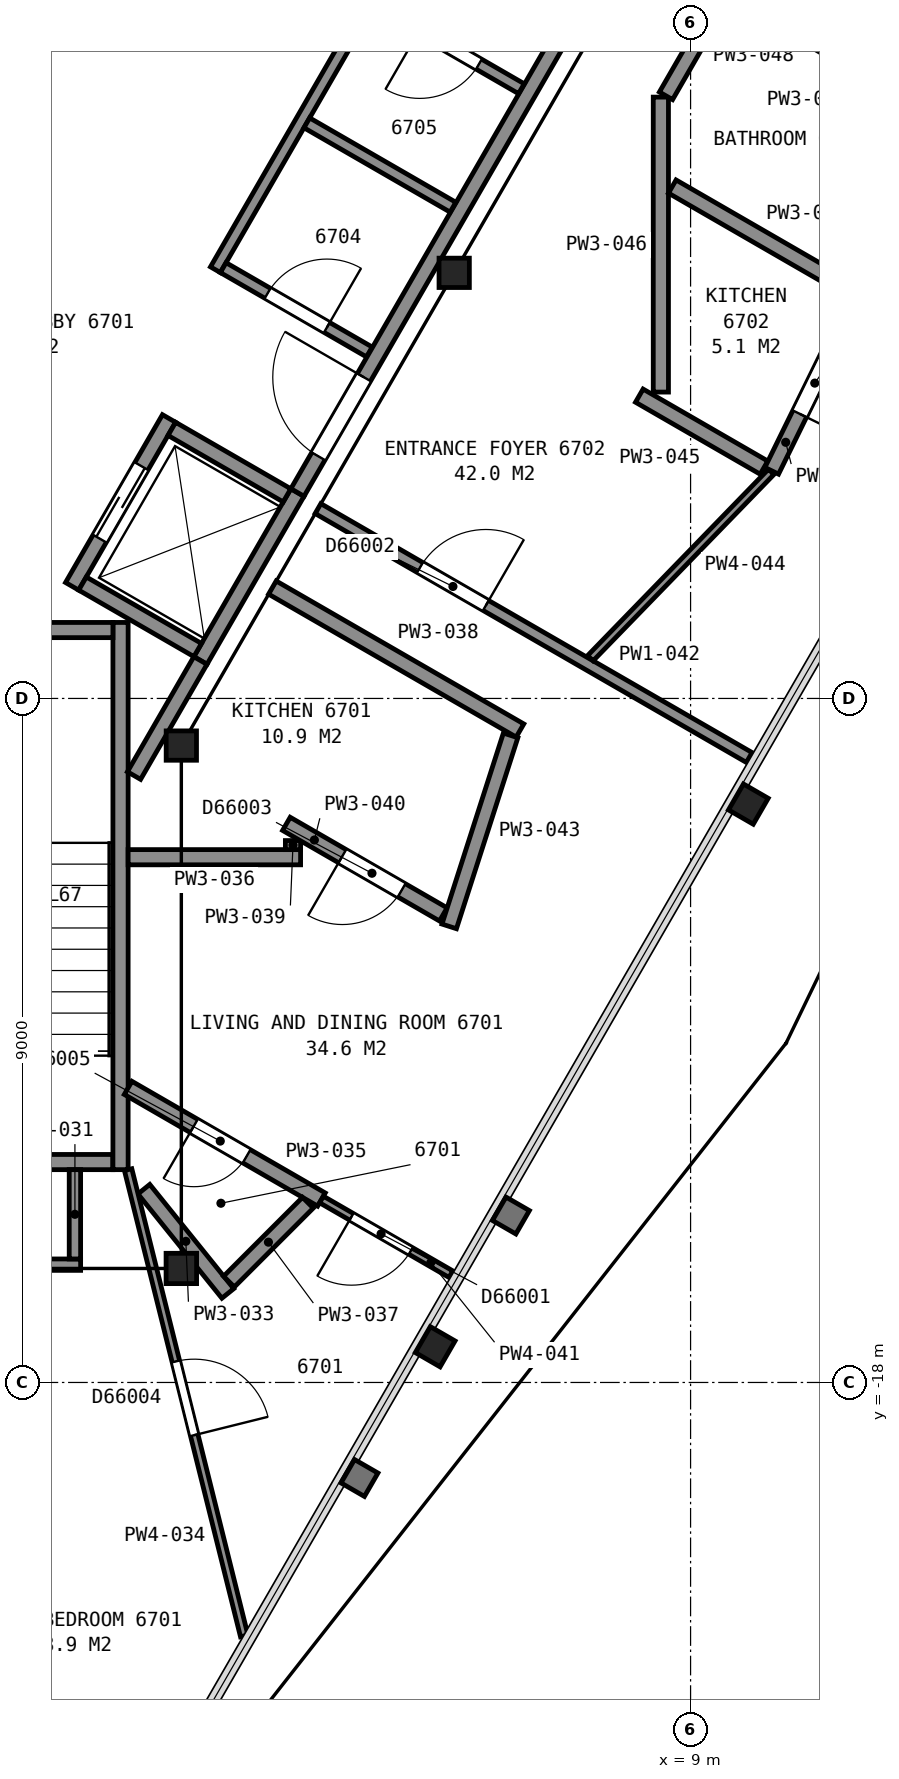
"""IFC4 building model, lengths in metres.
Left out: names, types, materials, properties, quantities, classifications, styles, units other than length and angle.
Written with IfcOpenShell. Run it as: python <this file> out.ifc"""

import sys

from ifc_helpers import new_model, si_unit, direction, frame, frame_2d, origin, origin_2d, place, context, subcontext, project, spatial, rectangle, i_section, extrude, element, fill, save


model = new_model("IFC4")
c1 = context("Model", 3, precision=1e-05, world=origin(), true_north=direction((0.0, 1.0)))
c2 = subcontext(c1, "Body", "Model", "MODEL_VIEW")
j1 = project(units=[si_unit("LENGTHUNIT", "METRE"), si_unit("PLANEANGLEUNIT", "RADIAN")], contexts=[c1])
p1 = place(None, origin())
s1 = spatial("IfcSite", under=j1, at=p1, CompositionType="ELEMENT")
p2 = place(p1, origin())
s2 = spatial("IfcBuilding", under=s1, at=p2, CompositionType="ELEMENT")
p3 = place(p2, frame((0.0, 0.0, 267.7)))
s3 = spatial("IfcBuildingStorey", under=s2, at=p3, CompositionType="ELEMENT", Elevation=267.7)
for number, where, z_axis, x_axis in (
    (1, (5.64, -17.53, 0.0), (0.0, 0.0, 1.0), (-0.5, -0.866, 0.0)),
    (2, (9.76, -10.39, 0.0), (0.0, 0.0, 1.0), (-0.5, -0.866, 0.0)),
):
    element("IfcColumn", number, at=place(p3, frame(where, z_axis=z_axis, x_axis=x_axis)), inside=s3, PredefinedType="COLUMN", context=c2, shape_type="SweptSolid", body=[
        extrude(i_section(OverallWidth=0.394, OverallDepth=0.376, WebThickness=0.017, FlangeThickness=0.028, FilletRadius=0.015, at=origin_2d()), origin(), (0.0, 0.0, 1.0), 3.7),
    ])
p4 = place(p3, frame((2.3, -16.5, 0.0), z_axis=(0.0, 0.0, 1.0), x_axis=(-1.0, 0.0, 0.0)))
e3 = element("IfcColumn", 3, at=p4, inside=s3, PredefinedType="COLUMN", context=c2, shape_type="SweptSolid", body=[
    extrude(i_section(OverallWidth=0.401, OverallDepth=0.399, WebThickness=0.025, FlangeThickness=0.04, FilletRadius=0.015, at=origin_2d()), origin(), (0.0, 0.0, 1.0), 3.7),
])
for number, where, z_axis, x_axis in (
    (4, (2.3, -9.62, 0.0), (0.0, 0.0, 1.0), (1.0, 0.0, 0.0)),
    (5, (5.89, -3.4, 0.0), (0.0, 0.0, 1.0), (1.0, 0.0, 0.0)),
):
    element("IfcColumn", number, at=place(p3, frame(where, z_axis=z_axis, x_axis=x_axis)), inside=s3, PredefinedType="COLUMN", context=c2, shape_type="SweptSolid", body=[
        extrude(i_section(OverallWidth=0.399, OverallDepth=0.386, WebThickness=0.021, FlangeThickness=0.033, FilletRadius=0.015, at=origin_2d()), origin(), (0.0, 0.0, 1.0), 3.7),
    ])
p5 = place(p3, frame((-1.4, -15.1, 0.0), z_axis=(0.0, 0.0, 1.0), x_axis=(1.0, 0.0, 0.0)))
e6 = element("IfcWall", 6, at=p5, inside=s3, PredefinedType="PARTITIONING", context=c2, shape_type="SweptSolid", body=[
    extrude(rectangle(XDim=2.8, YDim=0.2, at=frame_2d((1.4, 0.0))), origin(), (0.0, 0.0, 1.0), 3.45),
])
p6 = place(p5, frame((0.85, 0.0, 0.0)))
e7 = element("IfcOpeningElement", 7, at=p6, cuts=e6, PredefinedType="OPENING", context=c2, shape_type="SweptSolid", body=[
    extrude(rectangle(XDim=1.1, YDim=2.1, at=frame_2d((0.55, 1.05))), frame((0.0, 0.11, 0.0), z_axis=(0.0, -1.0, 0.0), x_axis=(1.0, 0.0, 0.0)), (0.0, 0.0, 1.0), 0.22),
])
p7 = place(p3, frame((1.5, -8.0, 0.0), z_axis=(0.0, 0.0, 1.0), x_axis=(0.0, -1.0, 0.0)))
e8 = element("IfcWall", 8, at=p7, inside=s3, PredefinedType="PARTITIONING", context=c2, shape_type="SweptSolid", body=[
    extrude(rectangle(XDim=7.2, YDim=0.2, at=frame_2d((3.6, 0.0))), origin(), (0.0, 0.0, 1.0), 3.45),
])
p8 = place(p3, frame((-1.4, -8.1, 0.0), z_axis=(0.0, 0.0, 1.0), x_axis=(1.0, 0.0, 0.0)))
e9 = element("IfcWall", 9, at=p8, inside=s3, PredefinedType="PARTITIONING", context=c2, shape_type="SweptSolid", body=[
    extrude(rectangle(XDim=2.8, YDim=0.2, at=frame_2d((1.4, 0.0))), origin(), (0.0, 0.0, 1.0), 3.45),
])
p9 = place(p3, frame((2.552, -8.5, 0.0), z_axis=(0.0, 0.0, 1.0), x_axis=(0.499990435942, 0.866030925526, 0.0)))
e10 = element("IfcWall", 10, at=p9, inside=s3, PredefinedType="PARTITIONING", context=c2, shape_type="SweptSolid", body=[
    extrude(rectangle(XDim=2.55, YDim=0.2, at=frame_2d((1.275, 0.0))), origin(), (0.0, 0.0, 1.0), 3.7),
])
p10 = place(p3, frame((0.863, -7.525, 0.0), z_axis=(0.0, 0.0, 1.0), x_axis=(0.499990435942, 0.866030925526, 0.0)))
e11 = element("IfcWall", 11, at=p10, inside=s3, PredefinedType="PARTITIONING", context=c2, shape_type="SweptSolid", body=[
    extrude(rectangle(XDim=2.55, YDim=0.2, at=frame_2d((1.275, 0.0))), origin(), (0.0, 0.0, 1.0), 3.7),
])
p11 = place(p10, frame((0.725, 0.0, 0.0)))
e12 = element("IfcOpeningElement", 12, at=p11, cuts=e11, PredefinedType="OPENING", context=c2, shape_type="SweptSolid", body=[
    extrude(rectangle(XDim=1.1, YDim=2.1, at=frame_2d((0.55, 1.05))), frame((0.0, 0.11, 0.0), z_axis=(0.0, -1.0, 0.0), x_axis=(1.0, 0.0, 0.0)), (0.0, 0.0, 1.0), 0.22),
])
for number, where, z_axis, x_axis in (
    (13, (3.69, -6.328, 0.0), (0.0, 0.0, 1.0), (-0.866, 0.5, 0.0)),
    (14, (2.515, -8.363, 0.0), (0.0, 0.0, 1.0), (-0.866, 0.5, 0.0)),
):
    element("IfcWall", number, at=place(p3, frame(where, z_axis=z_axis, x_axis=x_axis)), inside=s3, PredefinedType="PARTITIONING", context=c2, shape_type="SweptSolid", body=[
        extrude(rectangle(XDim=1.75, YDim=0.2, at=frame_2d((0.875, 0.0))), origin(), (0.0, 0.0, 1.0), 3.7),
    ])
p12 = place(p3, frame((1.677, -10.015, 0.0), z_axis=(0.0, 0.0, 1.0), x_axis=(0.49983532306, 0.866120459187, 0.0)))
e15 = element("IfcWall", 15, at=p12, inside=s3, PredefinedType="PARTITIONING", context=c2, shape_type="SweptSolid", body=[
    extrude(rectangle(XDim=1.748, YDim=0.2, at=frame_2d((0.874, 0.0))), origin(), (0.0, 0.0, 1.0), 3.45),
])
p13 = place(p3, frame((2.749, -3.359, 0.0), z_axis=(0.0, 0.0, 1.0), x_axis=(0.500017827812, 0.866015110648, 0.0)))
e16 = element("IfcWall", 16, at=p13, inside=s3, PredefinedType="PARTITIONING", context=c2, shape_type="SweptSolid", body=[
    extrude(rectangle(XDim=4.15, YDim=0.15, at=frame_2d((2.075, 0.0))), origin(), (0.0, 0.0, 1.0), 3.45),
])
p14 = place(p3, frame((2.851, -3.332, 0.0), z_axis=(0.0, 0.0, 1.0), x_axis=(0.866110524189, -0.499852538144, 0.0)))
e17 = element("IfcWall", 17, at=p14, inside=s3, PredefinedType="PARTITIONING", context=c2, shape_type="SweptSolid", body=[
    extrude(rectangle(XDim=2.22, YDim=0.15, at=frame_2d((1.11, 0.0))), origin(), (0.0, 0.0, 1.0), 3.45),
])
p15 = place(p14, frame((0.675, 0.0, 0.0)))
e18 = element("IfcOpeningElement", 18, at=p15, cuts=e17, PredefinedType="OPENING", context=c2, shape_type="SweptSolid", body=[
    extrude(rectangle(XDim=0.9, YDim=2.1, at=frame_2d((0.45, 1.05))), frame((0.0, 0.085, 0.0), z_axis=(0.0, -1.0, 0.0), x_axis=(1.0, 0.0, 0.0)), (0.0, 0.0, 1.0), 0.17),
])
p16 = place(p3, frame((3.828, -6.29, 0.0), z_axis=(0.0, 0.0, 1.0), x_axis=(0.499979739078, 0.866037101117, 0.0)))
e19 = element("IfcWall", 19, at=p16, inside=s3, PredefinedType="PARTITIONING", context=c2, shape_type="SweptSolid", body=[
    extrude(rectangle(XDim=11.363, YDim=0.2, at=frame_2d((5.681, 0.0))), origin(), (0.0, 0.0, 1.0), 3.45),
])
p17 = place(p16, frame((0.55, 0.0, 0.0)))
e20 = element("IfcOpeningElement", 20, at=p17, cuts=e19, PredefinedType="OPENING", context=c2, shape_type="SweptSolid", body=[
    extrude(rectangle(XDim=1.2, YDim=2.1, at=frame_2d((0.6, 1.05))), frame((0.0, 0.11, 0.0), z_axis=(0.0, -1.0, 0.0), x_axis=(1.0, 0.0, 0.0)), (0.0, 0.0, 1.0), 0.22),
])
p18 = place(p3, frame((3.951, -1.427, 0.0), z_axis=(0.0, 0.0, 1.0), x_axis=(0.866062920605, -0.499935013329, 0.0)))
e21 = element("IfcWall", 21, at=p18, inside=s3, PredefinedType="PARTITIONING", context=c2, shape_type="SweptSolid", body=[
    extrude(rectangle(XDim=2.22, YDim=0.15, at=frame_2d((1.11, 0.0))), origin(), (0.0, 0.0, 1.0), 3.45),
])
p19 = place(p3, frame((6.774, -0.978, 0.0), z_axis=(0.0, 0.0, 1.0), x_axis=(-0.866062920605, 0.499935013329, 0.0)))
e22 = element("IfcWall", 22, at=p19, inside=s3, PredefinedType="PARTITIONING", context=c2, shape_type="SweptSolid", body=[
    extrude(rectangle(XDim=2.22, YDim=0.15, at=frame_2d((1.11, 0.0))), origin(), (0.0, 0.0, 1.0), 3.45),
])
p20 = place(p19, frame((0.646, 0.0, 0.0)))
e23 = element("IfcOpeningElement", 23, at=p20, cuts=e22, PredefinedType="OPENING", context=c2, shape_type="SweptSolid", body=[
    extrude(rectangle(XDim=0.9, YDim=2.1, at=frame_2d((0.45, 1.05))), frame((0.0, 0.085, 0.0), z_axis=(0.0, -1.0, 0.0), x_axis=(1.0, 0.0, 0.0)), (0.0, 0.0, 1.0), 0.17),
])
p21 = place(p3, frame((-1.65, -16.45, 0.0), z_axis=(0.0, 0.0, 1.0), x_axis=(1.0, 0.0, 0.0)))
e24 = element("IfcWall", 24, at=p21, inside=s3, PredefinedType="PARTITIONING", context=c2, shape_type="SweptSolid", body=[
    extrude(rectangle(XDim=2.625, YDim=0.15, at=frame_2d((1.312, 0.0))), origin(), (0.0, 0.0, 1.0), 2.723),
])
p22 = place(p3, frame((0.9, -16.375, 0.0), z_axis=(0.0, 0.0, 1.0), x_axis=(0.0, 1.0, 0.0)))
e25 = element("IfcWall", 25, at=p22, inside=s3, PredefinedType="PARTITIONING", context=c2, shape_type="SweptSolid", body=[
    extrude(rectangle(XDim=1.175, YDim=0.15, at=frame_2d((0.587, 0.0))), origin(), (0.0, 0.0, 1.0), 2.723),
])
p23 = place(p3, frame((1.807, -15.457, 0.0), z_axis=(0.0, 0.0, 1.0), x_axis=(0.62721044395, -0.778849830841, 0.0)))
e26 = element("IfcWall", 26, at=p23, inside=s3, PredefinedType="PARTITIONING", context=c2, shape_type="SweptSolid", body=[
    extrude(rectangle(XDim=1.761, YDim=0.2, at=frame_2d((0.881, 0.0))), origin(), (0.0, 0.0, 1.0), 2.723),
])
p24 = place(p3, frame((3.127, -21.335, 0.0), z_axis=(0.0, 0.0, 1.0), x_axis=(-0.241554155251, 0.970387340231, 0.0)))
e27 = element("IfcWall", 27, at=p24, inside=s3, PredefinedType="PARTITIONING", context=c2, shape_type="SweptSolid", body=[
    extrude(rectangle(XDim=6.322, YDim=0.1, at=frame_2d((3.161, 0.0))), origin(), (0.0, 0.0, 1.0), 2.723),
])
p25 = place(p24, frame((2.722, 0.0, 0.0)))
e28 = element("IfcOpeningElement", 28, at=p25, cuts=e27, PredefinedType="OPENING", context=c2, shape_type="SweptSolid", body=[
    extrude(rectangle(XDim=1.0, YDim=2.1, at=frame_2d((0.5, 1.05))), frame((0.0, 0.06, 0.0), z_axis=(0.0, -1.0, 0.0), x_axis=(1.0, 0.0, 0.0)), (0.0, 0.0, 1.0), 0.12),
])
p26 = place(p3, frame((4.144, -15.593, 0.0), z_axis=(0.0, 0.0, 1.0), x_axis=(-0.865947474014, 0.500134954036, 0.0)))
e29 = element("IfcWall", 29, at=p26, inside=s3, PredefinedType="PARTITIONING", context=c2, shape_type="SweptSolid", body=[
    extrude(rectangle(XDim=2.937, YDim=0.2, at=frame_2d((1.469, 0.0))), origin(), (0.0, 0.0, 1.0), 2.723),
])
p27 = place(p26, frame((1.137, 0.0, 0.0)))
e30 = element("IfcOpeningElement", 30, at=p27, cuts=e29, PredefinedType="OPENING", context=c2, shape_type="SweptSolid", body=[
    extrude(rectangle(XDim=0.8, YDim=2.1, at=frame_2d((0.4, 1.05))), frame((0.0, 0.11, 0.0), z_axis=(0.0, -1.0, 0.0), x_axis=(1.0, 0.0, 0.0)), (0.0, 0.0, 1.0), 0.22),
])
p28 = place(p3, frame((1.6, -11.089, 0.0), z_axis=(0.0, 0.0, 1.0), x_axis=(1.0, 0.0, 0.0)))
e31 = element("IfcWall", 31, at=p28, inside=s3, PredefinedType="PARTITIONING", context=c2, shape_type="SweptSolid", body=[
    extrude(rectangle(XDim=2.269, YDim=0.2, at=frame_2d((1.134, 0.0))), origin(), (0.0, 0.0, 1.0), 2.723),
])
p29 = place(p3, frame((2.927, -16.673, 0.0), z_axis=(0.0, 0.0, 1.0), x_axis=(0.707106781187, 0.707106781187, 0.0)))
e32 = element("IfcWall", 32, at=p29, inside=s3, PredefinedType="PARTITIONING", context=c2, shape_type="SweptSolid", body=[
    extrude(rectangle(XDim=1.469, YDim=0.2, at=frame_2d((0.734, 0.0))), origin(), (0.0, 0.0, 1.0), 2.723),
])
p30 = place(p3, frame((3.498, -7.541, 0.0), z_axis=(0.0, 0.0, 1.0), x_axis=(0.865985624761, -0.500068892961, 0.0)))
e33 = element("IfcWall", 33, at=p30, inside=s3, PredefinedType="PARTITIONING", context=c2, shape_type="SweptSolid", body=[
    extrude(rectangle(XDim=3.762, YDim=0.2, at=frame_2d((1.881, 0.0))), origin(), (0.0, 0.0, 1.0), 2.723),
])
p31 = place(p3, frame((3.769, -10.989, 0.0), z_axis=(0.0, 0.0, 1.0), x_axis=(0.0, 1.0, 0.0)))
e34 = element("IfcWall", 34, at=p31, inside=s3, PredefinedType="PARTITIONING", context=c2, shape_type="SweptSolid", body=[
    extrude(rectangle(XDim=0.119, YDim=0.2, at=frame_2d((0.06, 0.0))), origin(), (0.0, 0.0, 1.0), 2.723),
])
p32 = place(p3, frame((3.682, -10.65, 0.0), z_axis=(0.0, 0.0, 1.0), x_axis=(0.86607302589, -0.499917507021, 0.0)))
e35 = element("IfcWall", 35, at=p32, inside=s3, PredefinedType="PARTITIONING", context=c2, shape_type="SweptSolid", body=[
    extrude(rectangle(XDim=2.384, YDim=0.2, at=frame_2d((1.192, 0.0))), origin(), (0.0, 0.0, 1.0), 2.723),
])
p33 = place(p32, frame((0.85, 0.0, 0.0)))
e36 = element("IfcOpeningElement", 36, at=p33, cuts=e35, PredefinedType="OPENING", context=c2, shape_type="SweptSolid", body=[
    extrude(rectangle(XDim=0.9, YDim=2.1, at=frame_2d((0.45, 1.05))), frame((0.0, 0.11, 0.0), z_axis=(0.0, -1.0, 0.0), x_axis=(1.0, 0.0, 0.0)), (0.0, 0.0, 1.0), 0.22),
])
p34 = place(p3, frame((5.847, -16.575, 0.0), z_axis=(0.0, 0.0, 1.0), x_axis=(-0.866156637233, 0.499772628079, 0.0)))
e37 = element("IfcWall", 37, at=p34, inside=s3, PredefinedType="PARTITIONING", context=c2, shape_type="SweptSolid", body=[
    extrude(rectangle(XDim=1.966, YDim=0.1, at=frame_2d((0.983, 0.0))), origin(), (0.0, 0.0, 1.0), 2.723),
])
p35 = place(p34, frame((0.611, 0.0, 0.0)))
e38 = element("IfcOpeningElement", 38, at=p35, cuts=e37, PredefinedType="OPENING", context=c2, shape_type="SweptSolid", body=[
    extrude(rectangle(XDim=0.9, YDim=2.1, at=frame_2d((0.45, 1.05))), frame((0.0, 0.06, 0.0), z_axis=(0.0, -1.0, 0.0), x_axis=(1.0, 0.0, 0.0)), (0.0, 0.0, 1.0), 0.12),
])
p36 = place(p3, frame((9.772, -9.777, 0.0), z_axis=(0.0, 0.0, 1.0), x_axis=(-0.866083818164, 0.499898809675, 0.0)))
e39 = element("IfcWall", 39, at=p36, inside=s3, PredefinedType="PARTITIONING", context=c2, shape_type="SweptSolid", body=[
    extrude(rectangle(XDim=6.551, YDim=0.15, at=frame_2d((3.275, 0.0))), origin(), (0.0, 0.0, 1.0), 2.723),
])
p37 = place(p36, frame((4.001, 0.0, 0.0)))
e40 = element("IfcOpeningElement", 40, at=p37, cuts=e39, PredefinedType="OPENING", context=c2, shape_type="SweptSolid", body=[
    extrude(rectangle(XDim=1.0, YDim=2.1, at=frame_2d((0.5, 1.05))), frame((0.0, 0.085, 0.0), z_axis=(0.0, -1.0, 0.0), x_axis=(1.0, 0.0, 0.0)), (0.0, 0.0, 1.0), 0.17),
])
p38 = place(p3, frame((5.824, -11.999, 0.0), z_axis=(0.0, 0.0, 1.0), x_axis=(0.306054089199, 0.95201412515, 0.0)))
e41 = element("IfcWall", 41, at=p38, inside=s3, PredefinedType="PARTITIONING", context=c2, shape_type="SweptSolid", body=[
    extrude(rectangle(XDim=2.64, YDim=0.2, at=frame_2d((1.32, 0.0))), origin(), (0.0, 0.0, 1.0), 2.723),
])
p39 = place(p3, frame((7.682, -8.47, 0.0), z_axis=(0.0, 0.0, 1.0), x_axis=(0.696344433623, 0.717707760696, 0.0)))
e42 = element("IfcWall", 42, at=p39, inside=s3, PredefinedType="PARTITIONING", context=c2, shape_type="SweptSolid", body=[
    extrude(rectangle(XDim=3.417, YDim=0.1, at=frame_2d((1.708, 0.0))), origin(), (0.0, 0.0, 1.0), 2.723),
])
p40 = place(p3, frame((8.325, -5.016, 0.0), z_axis=(0.0, 0.0, 1.0), x_axis=(0.866093293964, -0.499882392319, 0.0)))
e43 = element("IfcWall", 43, at=p40, inside=s3, PredefinedType="PARTITIONING", context=c2, shape_type="SweptSolid", body=[
    extrude(rectangle(XDim=1.894, YDim=0.2, at=frame_2d((0.947, 0.0))), origin(), (0.0, 0.0, 1.0), 2.723),
])
p41 = place(p3, frame((8.609, -4.969, 0.0), z_axis=(0.0, 0.0, 1.0), x_axis=(0.0, 1.0, 0.0)))
e44 = element("IfcWall", 44, at=p41, inside=s3, PredefinedType="PARTITIONING", context=c2, shape_type="SweptSolid", body=[
    extrude(rectangle(XDim=3.881, YDim=0.2, at=frame_2d((1.94, 0.0))), origin(), (0.0, 0.0, 1.0), 2.723),
])
p42 = place(p3, frame((8.759, -2.265, 0.0), z_axis=(0.0, 0.0, 1.0), x_axis=(0.866098885879, -0.499872703674, 0.0)))
e45 = element("IfcWall", 45, at=p42, inside=s3, PredefinedType="PARTITIONING", context=c2, shape_type="SweptSolid", body=[
    extrude(rectangle(XDim=2.813, YDim=0.2, at=frame_2d((1.407, 0.0))), origin(), (0.0, 0.0, 1.0), 2.723),
])
p43 = place(p3, frame((8.677, -1.071, 0.0), z_axis=(0.0, 0.0, 1.0), x_axis=(0.499803412959, 0.86613887362, 0.0)))
e46 = element("IfcWall", 46, at=p43, inside=s3, PredefinedType="PARTITIONING", context=c2, shape_type="SweptSolid", body=[
    extrude(rectangle(XDim=1.218, YDim=0.2, at=frame_2d((0.609, 0.0))), origin(), (0.0, 0.0, 1.0), 2.723),
])
p44 = place(p3, frame((10.186, -0.086, 0.0), z_axis=(0.0, 0.0, 1.0), x_axis=(0.866024864377, -0.50000093428, 0.0)))
e47 = element("IfcWall", 47, at=p44, inside=s3, PredefinedType="PARTITIONING", context=c2, shape_type="SweptSolid", body=[
    extrude(rectangle(XDim=2.353, YDim=0.2, at=frame_2d((1.176, 0.0))), origin(), (0.0, 0.0, 1.0), 2.723),
])
p45 = place(p3, frame((10.068, -6.005, 0.0), z_axis=(0.0, 0.0, 1.0), x_axis=(0.440614307878, 0.897696514248, 0.0)))
e48 = element("IfcWall", 48, at=p45, inside=s3, PredefinedType="PARTITIONING", context=c2, shape_type="SweptSolid", body=[
    extrude(rectangle(XDim=2.491, YDim=0.2, at=frame_2d((1.245, 0.0))), origin(), (0.0, 0.0, 1.0), 2.723),
])
p46 = place(p45, frame((0.835, 0.0, 0.0)))
e49 = element("IfcOpeningElement", 49, at=p46, cuts=e48, PredefinedType="OPENING", context=c2, shape_type="SweptSolid", body=[
    extrude(rectangle(XDim=0.9, YDim=2.1, at=frame_2d((0.45, 1.05))), frame((0.0, 0.11, 0.0), z_axis=(0.0, -1.0, 0.0), x_axis=(1.0, 0.0, 0.0)), (0.0, 0.0, 1.0), 0.22),
])
p47 = place(p11, origin())
e50 = element("IfcDoor", 50, at=p47, inside=s3, OperationType="SLIDING_TO_LEFT", PredefinedType="DOOR", context=c2, shape_type="SweptSolid", body=[
    extrude(rectangle(XDim=1.1, YDim=2.1, at=frame_2d((0.55, 1.05))), frame((0.0, 0.025, 0.0), z_axis=(0.0, -1.0, 0.0), x_axis=(1.0, 0.0, 0.0)), (0.0, 0.0, 1.0), 0.05),
])
fill(e12, e50)
p48 = place(p15, origin())
e51 = element("IfcDoor", 51, at=p48, inside=s3, OperationType="SINGLE_SWING_RIGHT", PredefinedType="DOOR", context=c2, shape_type="SweptSolid", body=[
    extrude(rectangle(XDim=0.9, YDim=2.1, at=frame_2d((0.45, 1.05))), frame((0.0, 0.025, 0.0), z_axis=(0.0, -1.0, 0.0), x_axis=(1.0, 0.0, 0.0)), (0.0, 0.0, 1.0), 0.05),
])
fill(e18, e51)
p49 = place(p17, origin())
e52 = element("IfcDoor", 52, at=p49, inside=s3, OperationType="SINGLE_SWING_RIGHT", PredefinedType="DOOR", context=c2, shape_type="SweptSolid", body=[
    extrude(rectangle(XDim=1.2, YDim=2.1, at=frame_2d((0.6, 1.05))), frame((0.0, 0.025, 0.0), z_axis=(0.0, -1.0, 0.0), x_axis=(1.0, 0.0, 0.0)), (0.0, 0.0, 1.0), 0.05),
])
fill(e20, e52)
p50 = place(p20, origin())
e53 = element("IfcDoor", 53, at=p50, inside=s3, OperationType="SINGLE_SWING_RIGHT", PredefinedType="DOOR", context=c2, shape_type="SweptSolid", body=[
    extrude(rectangle(XDim=0.9, YDim=2.1, at=frame_2d((0.45, 1.05))), frame((0.0, 0.025, 0.0), z_axis=(0.0, -1.0, 0.0), x_axis=(1.0, 0.0, 0.0)), (0.0, 0.0, 1.0), 0.05),
])
fill(e23, e53)
p51 = place(p25, origin())
e54 = element("IfcDoor", 54, at=p51, inside=s3, OperationType="SINGLE_SWING_LEFT", PredefinedType="DOOR", context=c2, shape_type="SweptSolid", body=[
    extrude(rectangle(XDim=1.0, YDim=2.1, at=frame_2d((0.5, 1.05))), frame((0.0, 0.025, 0.0), z_axis=(0.0, -1.0, 0.0), x_axis=(1.0, 0.0, 0.0)), (0.0, 0.0, 1.0), 0.05),
])
fill(e28, e54)
p52 = place(p27, origin())
e55 = element("IfcDoor", 55, at=p52, inside=s3, OperationType="SINGLE_SWING_RIGHT", PredefinedType="DOOR", context=c2, shape_type="SweptSolid", body=[
    extrude(rectangle(XDim=0.8, YDim=2.1, at=frame_2d((0.4, 1.05))), frame((0.0, 0.025, 0.0), z_axis=(0.0, -1.0, 0.0), x_axis=(1.0, 0.0, 0.0)), (0.0, 0.0, 1.0), 0.05),
])
fill(e30, e55)
p53 = place(p33, origin())
e56 = element("IfcDoor", 56, at=p53, inside=s3, OperationType="SINGLE_SWING_LEFT", PredefinedType="DOOR", context=c2, shape_type="SweptSolid", body=[
    extrude(rectangle(XDim=0.9, YDim=2.1, at=frame_2d((0.45, 1.05))), frame((0.0, 0.025, 0.0), z_axis=(0.0, -1.0, 0.0), x_axis=(1.0, 0.0, 0.0)), (0.0, 0.0, 1.0), 0.05),
])
fill(e36, e56)
p54 = place(p35, origin())
e57 = element("IfcDoor", 57, at=p54, inside=s3, OperationType="SINGLE_SWING_RIGHT", PredefinedType="DOOR", context=c2, shape_type="SweptSolid", body=[
    extrude(rectangle(XDim=0.9, YDim=2.1, at=frame_2d((0.45, 1.05))), frame((0.0, 0.025, 0.0), z_axis=(0.0, -1.0, 0.0), x_axis=(1.0, 0.0, 0.0)), (0.0, 0.0, 1.0), 0.05),
])
fill(e38, e57)
p55 = place(p37, origin())
e58 = element("IfcDoor", 58, at=p55, inside=s3, OperationType="SINGLE_SWING_LEFT", PredefinedType="DOOR", context=c2, shape_type="SweptSolid", body=[
    extrude(rectangle(XDim=1.0, YDim=2.1, at=frame_2d((0.5, 1.05))), frame((0.0, 0.025, 0.0), z_axis=(0.0, -1.0, 0.0), x_axis=(1.0, 0.0, 0.0)), (0.0, 0.0, 1.0), 0.05),
])
fill(e40, e58)
p56 = place(p46, origin())
e59 = element("IfcDoor", 59, at=p56, inside=s3, OperationType="SINGLE_SWING_LEFT", PredefinedType="DOOR", context=c2, shape_type="SweptSolid", body=[
    extrude(rectangle(XDim=0.9, YDim=2.1, at=frame_2d((0.45, 1.05))), frame((0.0, 0.025, 0.0), z_axis=(0.0, -1.0, 0.0), x_axis=(1.0, 0.0, 0.0)), (0.0, 0.0, 1.0), 0.05),
])
fill(e49, e59)
save(model, sys.argv[1])
